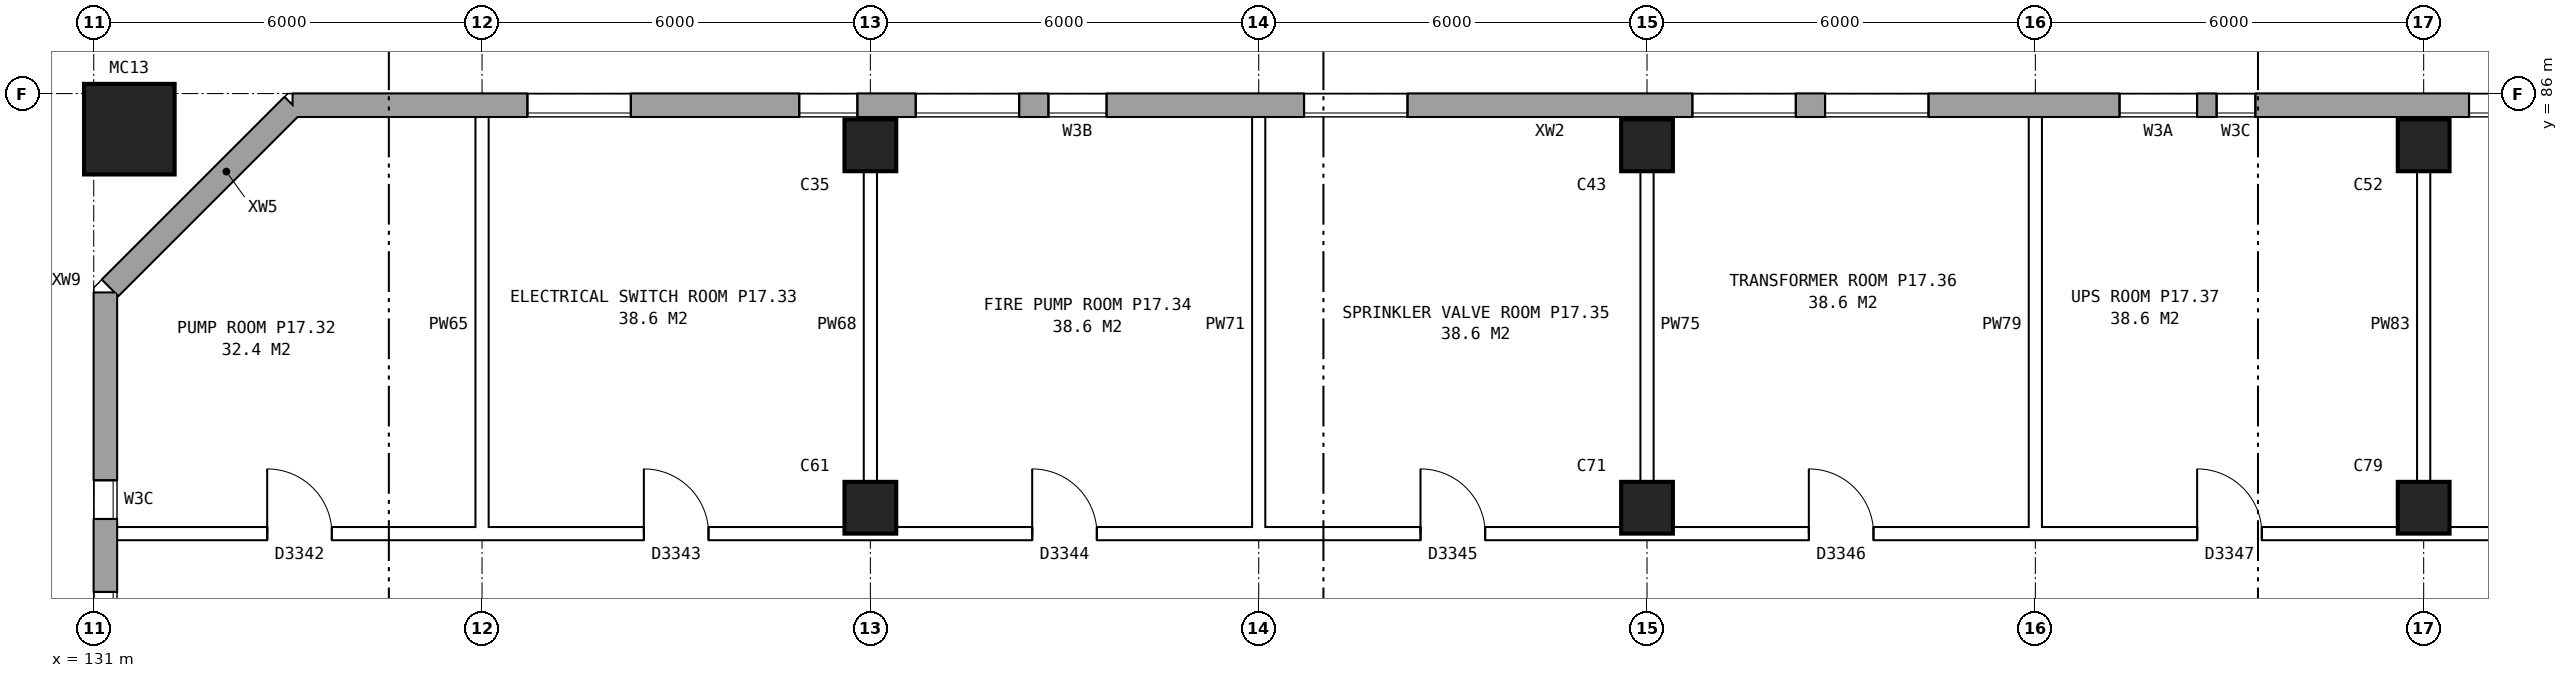
"""IFC4 building model, lengths in metres.
Left out: names, types, materials, properties, quantities, classifications, styles, units other than length and angle.
Written with IfcOpenShell. Run it as: python <this file> out.ifc"""

import sys

from ifc_helpers import new_model, si_unit, direction, frame, frame_2d, origin, origin_2d, place, context, subcontext, project, spatial, rectangle, hollow_rectangle, extrude, element, fill, save


model = new_model("IFC4")
c1 = context("Model", 3, precision=1e-05, world=origin(), true_north=direction((0.0, 1.0)))
c2 = subcontext(c1, "Body", "Model", "MODEL_VIEW")
j1 = project(units=[si_unit("LENGTHUNIT", "METRE"), si_unit("PLANEANGLEUNIT", "RADIAN")], contexts=[c1])
p1 = place(None, origin())
s1 = spatial("IfcSite", under=j1, at=p1, CompositionType="ELEMENT")
p2 = place(p1, origin())
s2 = spatial("IfcBuilding", under=s1, at=p2, CompositionType="ELEMENT")
p3 = place(p2, frame((0.0, 0.0, 62.9)))
s3 = spatial("IfcBuildingStorey", under=s2, at=p3, CompositionType="ELEMENT", Elevation=62.9)
for number, where, z_axis, x_axis in (
    (1, (143.0, 79.6, 0.0), (0.0, 0.0, 1.0), (1.0, 0.0, 0.0)),
    (2, (143.0, 85.2, 0.0), (0.0, 0.0, 1.0), (1.0, 0.0, 0.0)),
    (3, (155.0, 79.6, 0.0), (0.0, 0.0, 1.0), (1.0, 0.0, 0.0)),
    (4, (155.0, 85.2, 0.0), (0.0, 0.0, 1.0), (1.0, 0.0, 0.0)),
    (5, (167.0, 79.6, 0.0), (0.0, 0.0, 1.0), (1.0, 0.0, 0.0)),
    (6, (167.0, 85.2, 0.0), (0.0, 0.0, 1.0), (1.0, 0.0, 0.0)),
):
    element("IfcColumn", number, at=place(p3, frame(where, z_axis=z_axis, x_axis=x_axis)), inside=s3, PredefinedType="COLUMN", context=c2, shape_type="SweptSolid", body=[
        extrude(rectangle(XDim=0.8, YDim=0.8, at=origin_2d()), origin(), (0.0, 0.0, 1.0), 4.2),
    ])
p4 = place(p3, frame((131.55, 85.45, 0.0), z_axis=(0.0, 0.0, 1.0), x_axis=(1.0, 0.0, 0.0)))
e7 = element("IfcColumn", 7, at=p4, inside=s3, PredefinedType="COLUMN", context=c2, shape_type="SweptSolid", body=[
    extrude(hollow_rectangle(XDim=1.4, YDim=1.4, WallThickness=0.075, at=origin_2d()), origin(), (0.0, 0.0, 1.0), 4.5),
])
p5 = place(p3, frame((172.175, 85.82, 0.0), z_axis=(0.0, 0.0, 1.0), x_axis=(-1.0, 0.0, 0.0)))
e8 = element("IfcWall", 8, at=p5, inside=s3, PredefinedType="STANDARD", context=c2, shape_type="SweptSolid", body=[
    extrude(rectangle(XDim=38.101, YDim=0.36, at=frame_2d((19.05, 0.0))), origin(), (0.0, 0.0, 1.0), 4.2),
])
p6 = place(p5, frame((2.875, 0.0, 1.5)))
e9 = element("IfcOpeningElement", 9, at=p6, cuts=e8, PredefinedType="OPENING", context=c2, shape_type="SweptSolid", body=[
    extrude(rectangle(XDim=1.6, YDim=1.2, at=frame_2d((0.8, 0.6))), frame((0.0, 0.19, 0.0), z_axis=(0.0, -1.0, 0.0), x_axis=(1.0, 0.0, 0.0)), (0.0, 0.0, 1.0), 0.38),
])
p7 = place(p5, frame((7.775, 0.0, 1.5)))
e10 = element("IfcOpeningElement", 10, at=p7, cuts=e8, PredefinedType="OPENING", context=c2, shape_type="SweptSolid", body=[
    extrude(rectangle(XDim=0.6, YDim=1.2, at=frame_2d((0.3, 0.6))), frame((0.0, 0.19, 0.0), z_axis=(0.0, -1.0, 0.0), x_axis=(1.0, 0.0, 0.0)), (0.0, 0.0, 1.0), 0.38),
])
p8 = place(p5, frame((8.675, 0.0, 1.5)))
e11 = element("IfcOpeningElement", 11, at=p8, cuts=e8, PredefinedType="OPENING", context=c2, shape_type="SweptSolid", body=[
    extrude(rectangle(XDim=1.2, YDim=1.2, at=frame_2d((0.6, 0.6))), frame((0.0, 0.19, 0.0), z_axis=(0.0, -1.0, 0.0), x_axis=(1.0, 0.0, 0.0)), (0.0, 0.0, 1.0), 0.38),
])
p9 = place(p5, frame((12.825, 0.0, 1.5)))
e12 = element("IfcOpeningElement", 12, at=p9, cuts=e8, PredefinedType="OPENING", context=c2, shape_type="SweptSolid", body=[
    extrude(rectangle(XDim=1.6, YDim=1.2, at=frame_2d((0.8, 0.6))), frame((0.0, 0.19, 0.0), z_axis=(0.0, -1.0, 0.0), x_axis=(1.0, 0.0, 0.0)), (0.0, 0.0, 1.0), 0.38),
])
p10 = place(p5, frame((14.875, 0.0, 1.5)))
e13 = element("IfcOpeningElement", 13, at=p10, cuts=e8, PredefinedType="OPENING", context=c2, shape_type="SweptSolid", body=[
    extrude(rectangle(XDim=1.6, YDim=1.2, at=frame_2d((0.8, 0.6))), frame((0.0, 0.19, 0.0), z_axis=(0.0, -1.0, 0.0), x_axis=(1.0, 0.0, 0.0)), (0.0, 0.0, 1.0), 0.38),
])
p11 = place(p5, frame((20.875, 0.0, 1.5)))
e14 = element("IfcOpeningElement", 14, at=p11, cuts=e8, PredefinedType="OPENING", context=c2, shape_type="SweptSolid", body=[
    extrude(rectangle(XDim=1.6, YDim=1.2, at=frame_2d((0.8, 0.6))), frame((0.0, 0.19, 0.0), z_axis=(0.0, -1.0, 0.0), x_axis=(1.0, 0.0, 0.0)), (0.0, 0.0, 1.0), 0.38),
])
p12 = place(p5, frame((25.525, 0.0, 1.5)))
e15 = element("IfcOpeningElement", 15, at=p12, cuts=e8, PredefinedType="OPENING", context=c2, shape_type="SweptSolid", body=[
    extrude(rectangle(XDim=0.9, YDim=1.2, at=frame_2d((0.45, 0.6))), frame((0.0, 0.19, 0.0), z_axis=(0.0, -1.0, 0.0), x_axis=(1.0, 0.0, 0.0)), (0.0, 0.0, 1.0), 0.38),
])
p13 = place(p5, frame((26.875, 0.0, 1.5)))
e16 = element("IfcOpeningElement", 16, at=p13, cuts=e8, PredefinedType="OPENING", context=c2, shape_type="SweptSolid", body=[
    extrude(rectangle(XDim=1.6, YDim=1.2, at=frame_2d((0.8, 0.6))), frame((0.0, 0.19, 0.0), z_axis=(0.0, -1.0, 0.0), x_axis=(1.0, 0.0, 0.0)), (0.0, 0.0, 1.0), 0.38),
])
p14 = place(p5, frame((29.375, 0.0, 1.5)))
e17 = element("IfcOpeningElement", 17, at=p14, cuts=e8, PredefinedType="OPENING", context=c2, shape_type="SweptSolid", body=[
    extrude(rectangle(XDim=0.9, YDim=1.2, at=frame_2d((0.45, 0.6))), frame((0.0, 0.19, 0.0), z_axis=(0.0, -1.0, 0.0), x_axis=(1.0, 0.0, 0.0)), (0.0, 0.0, 1.0), 0.38),
])
p15 = place(p5, frame((32.875, 0.0, 1.5)))
e18 = element("IfcOpeningElement", 18, at=p15, cuts=e8, PredefinedType="OPENING", context=c2, shape_type="SweptSolid", body=[
    extrude(rectangle(XDim=1.6, YDim=1.2, at=frame_2d((0.8, 0.6))), frame((0.0, 0.19, 0.0), z_axis=(0.0, -1.0, 0.0), x_axis=(1.0, 0.0, 0.0)), (0.0, 0.0, 1.0), 0.38),
])
p16 = place(p3, frame((134.075, 85.82, 0.0), z_axis=(0.0, 0.0, 1.0), x_axis=(-0.707148882153, -0.707064677713, 0.0)))
e19 = element("IfcWall", 19, at=p16, inside=s3, PredefinedType="STANDARD", context=c2, shape_type="SweptSolid", body=[
    extrude(rectangle(XDim=2.899, YDim=0.36, at=frame_2d((1.45, 0.0))), origin(), (0.0, 0.0, 1.0), 4.2),
])
p17 = place(p3, frame((132.024, 83.77, 0.953), z_axis=(0.0, 0.0, 1.0), x_axis=(-0.706994764273, -0.707218780358, 0.0)))
e20 = element("IfcWall", 20, at=p17, inside=s3, PredefinedType="STANDARD", context=c2, shape_type="SweptSolid", body=[
    extrude(rectangle(XDim=1.09, YDim=0.36, at=frame_2d((0.545, 0.0))), origin(), (0.0, 0.0, 1.0), 2.444),
])
p18 = place(p3, frame((131.18, 82.925, 0.0), z_axis=(0.0, 0.0, 1.0), x_axis=(0.0, -1.0, 0.0)))
e21 = element("IfcWall", 21, at=p18, inside=s3, PredefinedType="STANDARD", context=c2, shape_type="SweptSolid", body=[
    extrude(rectangle(XDim=25.851, YDim=0.36, at=frame_2d((12.925, 0.0))), origin(), (0.0, 0.0, 1.0), 4.2),
])
p19 = place(p18, frame((2.9, 0.0, 1.5)))
e22 = element("IfcOpeningElement", 22, at=p19, cuts=e21, PredefinedType="OPENING", context=c2, shape_type="SweptSolid", body=[
    extrude(rectangle(XDim=0.6, YDim=1.2, at=frame_2d((0.3, 0.6))), frame((0.0, 0.19, 0.0), z_axis=(0.0, -1.0, 0.0), x_axis=(1.0, 0.0, 0.0)), (0.0, 0.0, 1.0), 0.38),
])
p20 = place(p18, frame((4.625, 0.0, 1.5)))
e23 = element("IfcOpeningElement", 23, at=p20, cuts=e21, PredefinedType="OPENING", context=c2, shape_type="SweptSolid", body=[
    extrude(rectangle(XDim=1.6, YDim=1.2, at=frame_2d((0.8, 0.6))), frame((0.0, 0.19, 0.0), z_axis=(0.0, -1.0, 0.0), x_axis=(1.0, 0.0, 0.0)), (0.0, 0.0, 1.0), 0.38),
])
p21 = place(p18, frame((21.125, 0.0, 1.5)))
e24 = element("IfcOpeningElement", 24, at=p21, cuts=e21, PredefinedType="OPENING", context=c2, shape_type="SweptSolid", body=[
    extrude(rectangle(XDim=0.6, YDim=1.2, at=frame_2d((0.3, 0.6))), frame((0.0, 0.19, 0.0), z_axis=(0.0, -1.0, 0.0), x_axis=(1.0, 0.0, 0.0)), (0.0, 0.0, 1.0), 0.38),
])
p22 = place(p18, frame((22.325, 0.0, 1.5)))
e25 = element("IfcOpeningElement", 25, at=p22, cuts=e21, PredefinedType="OPENING", context=c2, shape_type="SweptSolid", body=[
    extrude(rectangle(XDim=0.6, YDim=1.2, at=frame_2d((0.3, 0.6))), frame((0.0, 0.19, 0.0), z_axis=(0.0, -1.0, 0.0), x_axis=(1.0, 0.0, 0.0)), (0.0, 0.0, 1.0), 0.38),
])
p23 = place(p3, frame((131.24, 79.2, 0.0), z_axis=(0.0, 0.0, 1.0), x_axis=(1.0, 0.0, 0.0)))
e26 = element("IfcWall", 26, at=p23, inside=s3, PredefinedType="PARTITIONING", context=c2, shape_type="SweptSolid", body=[
    extrude(rectangle(XDim=43.77, YDim=0.2, at=frame_2d((21.885, 0.0))), origin(), (0.0, 0.0, 1.0), 4.2),
])
p24 = place(p23, frame((2.44, 0.0, 0.0)))
e27 = element("IfcOpeningElement", 27, at=p24, cuts=e26, PredefinedType="OPENING", context=c2, shape_type="SweptSolid", body=[
    extrude(rectangle(XDim=1.0, YDim=2.1, at=frame_2d((0.5, 1.05))), frame((0.0, 0.11, 0.0), z_axis=(0.0, -1.0, 0.0), x_axis=(1.0, 0.0, 0.0)), (0.0, 0.0, 1.0), 0.22),
])
p25 = place(p23, frame((8.26, 0.0, 0.0)))
e28 = element("IfcOpeningElement", 28, at=p25, cuts=e26, PredefinedType="OPENING", context=c2, shape_type="SweptSolid", body=[
    extrude(rectangle(XDim=1.0, YDim=2.1, at=frame_2d((0.5, 1.05))), frame((0.0, 0.11, 0.0), z_axis=(0.0, -1.0, 0.0), x_axis=(1.0, 0.0, 0.0)), (0.0, 0.0, 1.0), 0.22),
])
p26 = place(p23, frame((14.26, 0.0, 0.0)))
e29 = element("IfcOpeningElement", 29, at=p26, cuts=e26, PredefinedType="OPENING", context=c2, shape_type="SweptSolid", body=[
    extrude(rectangle(XDim=1.0, YDim=2.1, at=frame_2d((0.5, 1.05))), frame((0.0, 0.11, 0.0), z_axis=(0.0, -1.0, 0.0), x_axis=(1.0, 0.0, 0.0)), (0.0, 0.0, 1.0), 0.22),
])
p27 = place(p23, frame((20.26, 0.0, 0.0)))
e30 = element("IfcOpeningElement", 30, at=p27, cuts=e26, PredefinedType="OPENING", context=c2, shape_type="SweptSolid", body=[
    extrude(rectangle(XDim=1.0, YDim=2.1, at=frame_2d((0.5, 1.05))), frame((0.0, 0.11, 0.0), z_axis=(0.0, -1.0, 0.0), x_axis=(1.0, 0.0, 0.0)), (0.0, 0.0, 1.0), 0.22),
])
p28 = place(p23, frame((26.26, 0.0, 0.0)))
e31 = element("IfcOpeningElement", 31, at=p28, cuts=e26, PredefinedType="OPENING", context=c2, shape_type="SweptSolid", body=[
    extrude(rectangle(XDim=1.0, YDim=2.1, at=frame_2d((0.5, 1.05))), frame((0.0, 0.11, 0.0), z_axis=(0.0, -1.0, 0.0), x_axis=(1.0, 0.0, 0.0)), (0.0, 0.0, 1.0), 0.22),
])
p29 = place(p23, frame((32.26, 0.0, 0.0)))
e32 = element("IfcOpeningElement", 32, at=p29, cuts=e26, PredefinedType="OPENING", context=c2, shape_type="SweptSolid", body=[
    extrude(rectangle(XDim=1.0, YDim=2.1, at=frame_2d((0.5, 1.05))), frame((0.0, 0.11, 0.0), z_axis=(0.0, -1.0, 0.0), x_axis=(1.0, 0.0, 0.0)), (0.0, 0.0, 1.0), 0.22),
])
p30 = place(p23, frame((41.505, 0.0, 0.0)))
e33 = element("IfcOpeningElement", 33, at=p30, cuts=e26, PredefinedType="OPENING", context=c2, shape_type="SweptSolid", body=[
    extrude(rectangle(XDim=1.0, YDim=2.1, at=frame_2d((0.5, 1.05))), frame((0.0, 0.11, 0.0), z_axis=(0.0, -1.0, 0.0), x_axis=(1.0, 0.0, 0.0)), (0.0, 0.0, 1.0), 0.22),
])
for number, where, z_axis, x_axis in (
    (34, (137.0, 79.1, 0.0), (0.0, 0.0, 1.0), (0.0, 1.0, 0.0)),
    (35, (143.0, 79.1, 0.0), (0.0, 0.0, 1.0), (0.0, 1.0, 0.0)),
    (36, (149.0, 79.1, 0.0), (0.0, 0.0, 1.0), (0.0, 1.0, 0.0)),
    (37, (155.0, 79.1, 0.0), (0.0, 0.0, 1.0), (0.0, 1.0, 0.0)),
    (38, (161.0, 79.1, 0.0), (0.0, 0.0, 1.0), (0.0, 1.0, 0.0)),
    (39, (167.0, 79.1, 0.0), (0.0, 0.0, 1.0), (0.0, 1.0, 0.0)),
):
    element("IfcWall", number, at=place(p3, frame(where, z_axis=z_axis, x_axis=x_axis)), inside=s3, PredefinedType="PARTITIONING", context=c2, shape_type="SweptSolid", body=[
        extrude(rectangle(XDim=6.66, YDim=0.2, at=frame_2d((3.33, 0.0))), origin(), (0.0, 0.0, 1.0), 4.2),
    ])
p31 = place(p6, origin())
e40 = element("IfcWindow", 40, at=p31, inside=s3, PartitioningType="DOUBLE_PANEL_HORIZONTAL", PredefinedType="WINDOW", context=c2, shape_type="SweptSolid", body=[
    extrude(rectangle(XDim=1.6, YDim=1.2, at=frame_2d((0.8, 0.6))), frame((0.0, 0.15, 0.0), z_axis=(0.0, -1.0, 0.0), x_axis=(1.0, 0.0, 0.0)), (0.0, 0.0, 1.0), 0.06),
])
fill(e9, e40)
p32 = place(p7, origin())
e41 = element("IfcWindow", 41, at=p32, inside=s3, PartitioningType="DOUBLE_PANEL_HORIZONTAL", PredefinedType="WINDOW", context=c2, shape_type="SweptSolid", body=[
    extrude(rectangle(XDim=0.6, YDim=1.2, at=frame_2d((0.3, 0.6))), frame((0.0, 0.15, 0.0), z_axis=(0.0, -1.0, 0.0), x_axis=(1.0, 0.0, 0.0)), (0.0, 0.0, 1.0), 0.06),
])
fill(e10, e41)
p33 = place(p8, origin())
e42 = element("IfcWindow", 42, at=p33, inside=s3, PartitioningType="DOUBLE_PANEL_HORIZONTAL", PredefinedType="WINDOW", context=c2, shape_type="SweptSolid", body=[
    extrude(rectangle(XDim=1.2, YDim=1.2, at=frame_2d((0.6, 0.6))), frame((0.0, 0.15, 0.0), z_axis=(0.0, -1.0, 0.0), x_axis=(1.0, 0.0, 0.0)), (0.0, 0.0, 1.0), 0.06),
])
fill(e11, e42)
p34 = place(p9, origin())
e43 = element("IfcWindow", 43, at=p34, inside=s3, PartitioningType="DOUBLE_PANEL_HORIZONTAL", PredefinedType="WINDOW", context=c2, shape_type="SweptSolid", body=[
    extrude(rectangle(XDim=1.6, YDim=1.2, at=frame_2d((0.8, 0.6))), frame((0.0, 0.15, 0.0), z_axis=(0.0, -1.0, 0.0), x_axis=(1.0, 0.0, 0.0)), (0.0, 0.0, 1.0), 0.06),
])
fill(e12, e43)
p35 = place(p10, origin())
e44 = element("IfcWindow", 44, at=p35, inside=s3, PartitioningType="DOUBLE_PANEL_HORIZONTAL", PredefinedType="WINDOW", context=c2, shape_type="SweptSolid", body=[
    extrude(rectangle(XDim=1.6, YDim=1.2, at=frame_2d((0.8, 0.6))), frame((0.0, 0.15, 0.0), z_axis=(0.0, -1.0, 0.0), x_axis=(1.0, 0.0, 0.0)), (0.0, 0.0, 1.0), 0.06),
])
fill(e13, e44)
p36 = place(p11, origin())
e45 = element("IfcWindow", 45, at=p36, inside=s3, PartitioningType="DOUBLE_PANEL_HORIZONTAL", PredefinedType="WINDOW", context=c2, shape_type="SweptSolid", body=[
    extrude(rectangle(XDim=1.6, YDim=1.2, at=frame_2d((0.8, 0.6))), frame((0.0, 0.15, 0.0), z_axis=(0.0, -1.0, 0.0), x_axis=(1.0, 0.0, 0.0)), (0.0, 0.0, 1.0), 0.06),
])
fill(e14, e45)
p37 = place(p12, origin())
e46 = element("IfcWindow", 46, at=p37, inside=s3, PartitioningType="DOUBLE_PANEL_HORIZONTAL", PredefinedType="WINDOW", context=c2, shape_type="SweptSolid", body=[
    extrude(rectangle(XDim=0.9, YDim=1.2, at=frame_2d((0.45, 0.6))), frame((0.0, 0.15, 0.0), z_axis=(0.0, -1.0, 0.0), x_axis=(1.0, 0.0, 0.0)), (0.0, 0.0, 1.0), 0.06),
])
fill(e15, e46)
p38 = place(p13, origin())
e47 = element("IfcWindow", 47, at=p38, inside=s3, PartitioningType="DOUBLE_PANEL_HORIZONTAL", PredefinedType="WINDOW", context=c2, shape_type="SweptSolid", body=[
    extrude(rectangle(XDim=1.6, YDim=1.2, at=frame_2d((0.8, 0.6))), frame((0.0, 0.15, 0.0), z_axis=(0.0, -1.0, 0.0), x_axis=(1.0, 0.0, 0.0)), (0.0, 0.0, 1.0), 0.06),
])
fill(e16, e47)
p39 = place(p14, origin())
e48 = element("IfcWindow", 48, at=p39, inside=s3, PartitioningType="DOUBLE_PANEL_HORIZONTAL", PredefinedType="WINDOW", context=c2, shape_type="SweptSolid", body=[
    extrude(rectangle(XDim=0.9, YDim=1.2, at=frame_2d((0.45, 0.6))), frame((0.0, 0.15, 0.0), z_axis=(0.0, -1.0, 0.0), x_axis=(1.0, 0.0, 0.0)), (0.0, 0.0, 1.0), 0.06),
])
fill(e17, e48)
p40 = place(p15, origin())
e49 = element("IfcWindow", 49, at=p40, inside=s3, PartitioningType="DOUBLE_PANEL_HORIZONTAL", PredefinedType="WINDOW", context=c2, shape_type="SweptSolid", body=[
    extrude(rectangle(XDim=1.6, YDim=1.2, at=frame_2d((0.8, 0.6))), frame((0.0, 0.15, 0.0), z_axis=(0.0, -1.0, 0.0), x_axis=(1.0, 0.0, 0.0)), (0.0, 0.0, 1.0), 0.06),
])
fill(e18, e49)
p41 = place(p19, origin())
e50 = element("IfcWindow", 50, at=p41, inside=s3, PartitioningType="DOUBLE_PANEL_HORIZONTAL", PredefinedType="WINDOW", context=c2, shape_type="SweptSolid", body=[
    extrude(rectangle(XDim=0.6, YDim=1.2, at=frame_2d((0.3, 0.6))), frame((0.0, 0.15, 0.0), z_axis=(0.0, -1.0, 0.0), x_axis=(1.0, 0.0, 0.0)), (0.0, 0.0, 1.0), 0.06),
])
fill(e22, e50)
p42 = place(p20, origin())
e51 = element("IfcWindow", 51, at=p42, inside=s3, PartitioningType="DOUBLE_PANEL_HORIZONTAL", PredefinedType="WINDOW", context=c2, shape_type="SweptSolid", body=[
    extrude(rectangle(XDim=1.6, YDim=1.2, at=frame_2d((0.8, 0.6))), frame((0.0, 0.15, 0.0), z_axis=(0.0, -1.0, 0.0), x_axis=(1.0, 0.0, 0.0)), (0.0, 0.0, 1.0), 0.06),
])
fill(e23, e51)
p43 = place(p24, origin())
e52 = element("IfcDoor", 52, at=p43, inside=s3, OperationType="SINGLE_SWING_LEFT", PredefinedType="DOOR", context=c2, shape_type="SweptSolid", body=[
    extrude(rectangle(XDim=1.0, YDim=2.1, at=frame_2d((0.5, 1.05))), frame((0.0, 0.025, 0.0), z_axis=(0.0, -1.0, 0.0), x_axis=(1.0, 0.0, 0.0)), (0.0, 0.0, 1.0), 0.05),
])
fill(e27, e52)
p44 = place(p25, origin())
e53 = element("IfcDoor", 53, at=p44, inside=s3, OperationType="SINGLE_SWING_LEFT", PredefinedType="DOOR", context=c2, shape_type="SweptSolid", body=[
    extrude(rectangle(XDim=1.0, YDim=2.1, at=frame_2d((0.5, 1.05))), frame((0.0, 0.025, 0.0), z_axis=(0.0, -1.0, 0.0), x_axis=(1.0, 0.0, 0.0)), (0.0, 0.0, 1.0), 0.05),
])
fill(e28, e53)
p45 = place(p26, origin())
e54 = element("IfcDoor", 54, at=p45, inside=s3, OperationType="SINGLE_SWING_LEFT", PredefinedType="DOOR", context=c2, shape_type="SweptSolid", body=[
    extrude(rectangle(XDim=1.0, YDim=2.1, at=frame_2d((0.5, 1.05))), frame((0.0, 0.025, 0.0), z_axis=(0.0, -1.0, 0.0), x_axis=(1.0, 0.0, 0.0)), (0.0, 0.0, 1.0), 0.05),
])
fill(e29, e54)
p46 = place(p27, origin())
e55 = element("IfcDoor", 55, at=p46, inside=s3, OperationType="SINGLE_SWING_LEFT", PredefinedType="DOOR", context=c2, shape_type="SweptSolid", body=[
    extrude(rectangle(XDim=1.0, YDim=2.1, at=frame_2d((0.5, 1.05))), frame((0.0, 0.025, 0.0), z_axis=(0.0, -1.0, 0.0), x_axis=(1.0, 0.0, 0.0)), (0.0, 0.0, 1.0), 0.05),
])
fill(e30, e55)
p47 = place(p28, origin())
e56 = element("IfcDoor", 56, at=p47, inside=s3, OperationType="SINGLE_SWING_LEFT", PredefinedType="DOOR", context=c2, shape_type="SweptSolid", body=[
    extrude(rectangle(XDim=1.0, YDim=2.1, at=frame_2d((0.5, 1.05))), frame((0.0, 0.025, 0.0), z_axis=(0.0, -1.0, 0.0), x_axis=(1.0, 0.0, 0.0)), (0.0, 0.0, 1.0), 0.05),
])
fill(e31, e56)
p48 = place(p29, origin())
e57 = element("IfcDoor", 57, at=p48, inside=s3, OperationType="SINGLE_SWING_LEFT", PredefinedType="DOOR", context=c2, shape_type="SweptSolid", body=[
    extrude(rectangle(XDim=1.0, YDim=2.1, at=frame_2d((0.5, 1.05))), frame((0.0, 0.025, 0.0), z_axis=(0.0, -1.0, 0.0), x_axis=(1.0, 0.0, 0.0)), (0.0, 0.0, 1.0), 0.05),
])
fill(e32, e57)
save(model, sys.argv[1])
